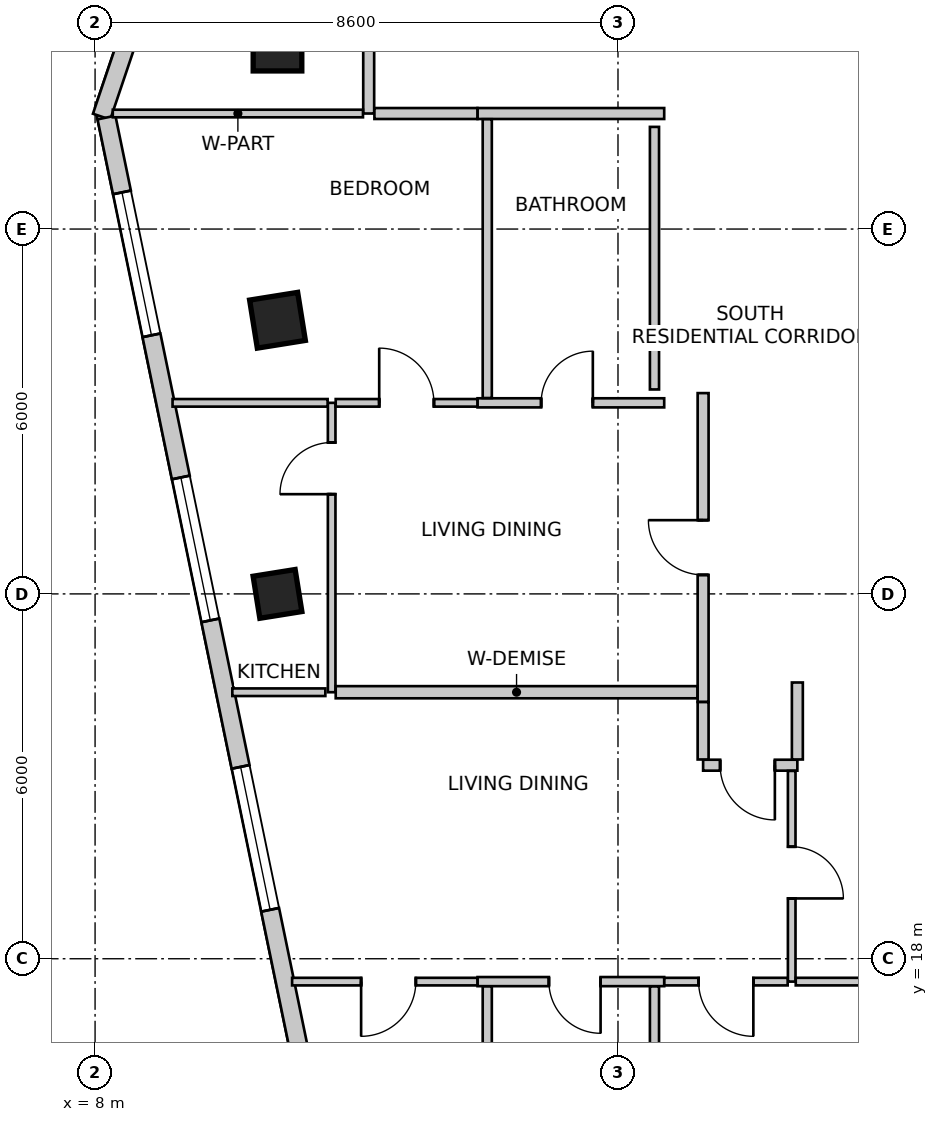
"""IFC4 building model, lengths in metres.
Left out: names, types, materials, properties, quantities, classifications, styles, units other than length and angle.
Written with IfcOpenShell. Run it as: python <this file> out.ifc"""

import sys

from ifc_helpers import new_model, si_unit, direction, frame, frame_2d, origin, origin_2d, place, context, subcontext, project, spatial, rectangle, extrude, source, transform, mapped, element, fill, save


model = new_model("IFC4")
c1 = context("Model", 3, precision=1e-05, world=origin(), true_north=direction((0.0, 1.0)))
c2 = subcontext(c1, "Body", "Model", "MODEL_VIEW")
j1 = project(units=[si_unit("LENGTHUNIT", "METRE"), si_unit("PLANEANGLEUNIT", "RADIAN")], contexts=[c1])
p1 = place(None, origin())
s1 = spatial("IfcSite", under=j1, at=p1, CompositionType="ELEMENT")
p2 = place(p1, origin())
s2 = spatial("IfcBuilding", under=s1, at=p2, CompositionType="ELEMENT")
p3 = place(p2, frame((0.0, 0.0, 218.4)))
s3 = spatial("IfcBuildingStorey", under=s2, at=p3, CompositionType="ELEMENT", Elevation=218.4)
m1 = source(origin(), c2, "Body", "SweptSolid", [
    extrude(rectangle(XDim=0.8, YDim=0.8, at=origin_2d()), origin(), (0.0, 0.0, 1.0), 3.5),
])
for number, where, z_axis, x_axis in (
    (1, (11.0, 33.0, 0.0), (0.0, 0.0, 1.0), (1.0, 0.0, 0.0)),
    (2, (11.0, 28.5, 0.0), (0.0, 0.0, 1.0), (0.158, -0.987, 0.0)),
):
    element("IfcColumn", number, at=place(p3, frame(where, z_axis=z_axis, x_axis=x_axis)), inside=s3, PredefinedType="COLUMN", context=c2, shape_type="MappedRepresentation", body=[
        mapped(m1, transform((0.0, 0.0, 0.0), scale=1.0)),
    ])
m2 = source(origin(), c2, "Body", "SweptSolid", [
    extrude(rectangle(XDim=0.7, YDim=0.7, at=origin_2d()), origin(), (0.0, 0.0, 1.0), 3.5),
])
p4 = place(p3, frame((11.0, 24.0, 0.0), z_axis=(0.0, 0.0, 1.0), x_axis=(0.158158067254, -0.987413806751, 0.0)))
e3 = element("IfcColumn", 3, at=p4, inside=s3, PredefinedType="COLUMN", context=c2, shape_type="MappedRepresentation", body=[
    mapped(m2, transform((0.0, 0.0, 0.0), scale=1.0)),
])
p5 = place(p3, frame((13.269, 47.134, 0.0), z_axis=(0.0, 0.0, 1.0), x_axis=(-0.319920776449, -0.947444297464, 0.0)))
e4 = element("IfcWall", 4, at=p5, inside=s3, PredefinedType="SOLIDWALL", context=c2, shape_type="SweptSolid", body=[
    extrude(rectangle(XDim=16.133, YDim=0.3, at=frame_2d((8.067, 0.0))), origin(), (0.0, 0.0, 1.0), 3.25),
])
m3 = source(origin(), c2, "Body", "SweptSolid", [
    extrude(rectangle(XDim=2.1, YDim=2.0, at=frame_2d((1.05, 1.0))), frame((0.0, 0.16, 0.0), z_axis=(0.0, -1.0, 0.0), x_axis=(1.0, 0.0, 0.0)), (0.0, 0.0, 1.0), 0.32),
])
p6 = place(p5, frame((2.513, 0.0, 0.85)))
e5 = element("IfcOpeningElement", 5, at=p6, cuts=e4, PredefinedType="OPENING", context=c2, shape_type="MappedRepresentation", body=[
    mapped(m3, transform((0.0, 0.0, 0.0), scale=1.0)),
])
m4 = source(origin(), c2, "Body", "SweptSolid", [
    extrude(rectangle(XDim=2.4, YDim=2.2, at=frame_2d((1.2, 1.1))), frame((0.0, 0.16, 0.0), z_axis=(0.0, -1.0, 0.0), x_axis=(1.0, 0.0, 0.0)), (0.0, 0.0, 1.0), 0.32),
])
p7 = place(p5, frame((7.26, 0.0, 0.85)))
e6 = element("IfcOpeningElement", 6, at=p7, cuts=e4, PredefinedType="OPENING", context=c2, shape_type="MappedRepresentation", body=[
    mapped(m4, transform((0.0, 0.0, 0.0), scale=1.0)),
])
p8 = place(p5, frame((12.307, 0.0, 0.85)))
e7 = element("IfcOpeningElement", 7, at=p8, cuts=e4, PredefinedType="OPENING", context=c2, shape_type="MappedRepresentation", body=[
    mapped(m3, transform((0.0, 0.0, 0.0), scale=1.0)),
])
p9 = place(p3, frame((8.188, 31.834, 0.0), z_axis=(0.0, 0.0, 1.0), x_axis=(0.202303475707, -0.979322880217, 0.0)))
e8 = element("IfcWall", 8, at=p9, inside=s3, PredefinedType="SOLIDWALL", context=c2, shape_type="SweptSolid", body=[
    extrude(rectangle(XDim=15.766, YDim=0.3, at=frame_2d((7.883, 0.0))), origin(), (0.0, 0.0, 1.0), 3.25),
])
p10 = place(p9, frame((1.257, 0.0, 0.85)))
e9 = element("IfcOpeningElement", 9, at=p10, cuts=e8, PredefinedType="OPENING", context=c2, shape_type="MappedRepresentation", body=[
    mapped(m4, transform((0.0, 0.0, 0.0), scale=1.0)),
])
p11 = place(p9, frame((6.044, 0.0, 0.85)))
e10 = element("IfcOpeningElement", 10, at=p11, cuts=e8, PredefinedType="OPENING", context=c2, shape_type="MappedRepresentation", body=[
    mapped(m4, transform((0.0, 0.0, 0.0), scale=1.0)),
])
p12 = place(p9, frame((10.904, 0.0, 0.85)))
e11 = element("IfcOpeningElement", 11, at=p12, cuts=e8, PredefinedType="OPENING", context=c2, shape_type="MappedRepresentation", body=[
    mapped(m4, transform((0.0, 0.0, 0.0), scale=1.0)),
])
p13 = place(p3, frame((12.5, 31.9, 0.0), z_axis=(0.0, 0.0, 1.0), x_axis=(0.0, 1.0, 0.0)))
e12 = element("IfcWall", 12, at=p13, inside=s3, PredefinedType="PARTITIONING", context=c2, shape_type="SweptSolid", body=[
    extrude(rectangle(XDim=1.556, YDim=0.18, at=frame_2d((0.778, 0.0))), origin(), (0.0, 0.0, 1.0), 2.919),
])
p14 = place(p3, frame((17.36, 31.9, 0.0), z_axis=(0.0, 0.0, 1.0), x_axis=(-1.0, 0.0, 0.0)))
e13 = element("IfcWall", 13, at=p14, inside=s3, PredefinedType="PARTITIONING", context=c2, shape_type="SweptSolid", body=[
    extrude(rectangle(XDim=3.07, YDim=0.18, at=frame_2d((1.535, 0.0))), origin(), (0.0, 0.0, 1.0), 2.919),
])
p15 = place(p3, frame((14.288, 31.9, 0.0), z_axis=(0.0, 0.0, 1.0), x_axis=(-1.0, 0.0, 0.0)))
e14 = element("IfcWall", 14, at=p15, inside=s3, PredefinedType="PARTITIONING", context=c2, shape_type="SweptSolid", body=[
    extrude(rectangle(XDim=1.694, YDim=0.18, at=frame_2d((0.847, 0.0))), origin(), (0.0, 0.0, 1.0), 2.919),
])
p16 = place(p3, frame((12.406, 31.9, 0.0), z_axis=(0.0, 0.0, 1.0), x_axis=(-1.0, 0.0, 0.0)))
e15 = element("IfcWall", 15, at=p16, inside=s3, PredefinedType="PARTITIONING", context=c2, shape_type="SweptSolid", body=[
    extrude(rectangle(XDim=4.115, YDim=0.125, at=frame_2d((2.057, 0.0))), origin(), (0.0, 0.0, 1.0), 2.542),
])
p17 = place(p3, frame((18.0, 22.223, 0.0), z_axis=(0.0, 0.0, 1.0), x_axis=(0.0, 1.0, 0.0)))
e16 = element("IfcWall", 16, at=p17, inside=s3, PredefinedType="PARTITIONING", context=c2, shape_type="SweptSolid", body=[
    extrude(rectangle(XDim=5.079, YDim=0.18, at=frame_2d((2.54, 0.0))), origin(), (0.0, 0.0, 1.0), 2.766),
])
m5 = source(origin(), c2, "Body", "SweptSolid", [
    extrude(rectangle(XDim=0.9, YDim=2.15, at=frame_2d((0.45, 1.075))), frame((0.0, 0.1, 0.0), z_axis=(0.0, -1.0, 0.0), x_axis=(1.0, 0.0, 0.0)), (0.0, 0.0, 1.0), 0.2),
])
p18 = place(p17, frame((2.09, 0.0, 0.0)))
e17 = element("IfcOpeningElement", 17, at=p18, cuts=e16, PredefinedType="OPENING", context=c2, shape_type="MappedRepresentation", body=[
    mapped(m5, transform((0.0, 0.0, 0.0), scale=1.0)),
])
p19 = place(p3, frame((19.55, 21.183, 0.0), z_axis=(0.0, 0.0, 1.0), x_axis=(-1.0, 0.0, 0.0)))
e18 = element("IfcWall", 18, at=p19, inside=s3, PredefinedType="PARTITIONING", context=c2, shape_type="SweptSolid", body=[
    extrude(rectangle(XDim=1.55, YDim=0.18, at=frame_2d((0.775, 0.0))), origin(), (0.0, 0.0, 1.0), 2.779),
])
p20 = place(p19, frame((0.37, 0.0, 0.0)))
e19 = element("IfcOpeningElement", 19, at=p20, cuts=e18, PredefinedType="OPENING", context=c2, shape_type="MappedRepresentation", body=[
    mapped(m5, transform((0.0, 0.0, 0.0), scale=1.0)),
])
p21 = place(p3, frame((18.0, 21.277, 0.0), z_axis=(0.0, 0.0, 1.0), x_axis=(0.0, 1.0, 0.0)))
e20 = element("IfcWall", 20, at=p21, inside=s3, PredefinedType="PARTITIONING", context=c2, shape_type="SweptSolid", body=[
    extrude(rectangle(XDim=0.944, YDim=0.18, at=frame_2d((0.472, 0.0))), origin(), (0.0, 0.0, 1.0), 2.779),
])
p22 = place(p3, frame((19.55, 22.543, 0.0), z_axis=(0.0, 0.0, 1.0), x_axis=(0.0, -1.0, 0.0)))
e21 = element("IfcWall", 21, at=p22, inside=s3, PredefinedType="PARTITIONING", context=c2, shape_type="SweptSolid", body=[
    extrude(rectangle(XDim=1.266, YDim=0.18, at=frame_2d((0.633, 0.0))), origin(), (0.0, 0.0, 1.0), 3.25),
])
p23 = place(p3, frame((11.891, 22.383, 0.0), z_axis=(0.0, 0.0, 1.0), x_axis=(0.0, 1.0, 0.0)))
e22 = element("IfcWall", 22, at=p23, inside=s3, PredefinedType="PARTITIONING", context=c2, shape_type="SweptSolid", body=[
    extrude(rectangle(XDim=4.759, YDim=0.125, at=frame_2d((2.379, 0.0))), origin(), (0.0, 0.0, 1.0), 2.766),
])
m6 = source(origin(), c2, "Body", "SweptSolid", [
    extrude(rectangle(XDim=0.85, YDim=2.15, at=frame_2d((0.425, 1.075))), frame((0.0, 0.073, 0.0), z_axis=(0.0, -1.0, 0.0), x_axis=(1.0, 0.0, 0.0)), (0.0, 0.0, 1.0), 0.145),
])
p24 = place(p23, frame((3.257, 0.0, 0.0)))
e23 = element("IfcOpeningElement", 23, at=p24, cuts=e22, PredefinedType="OPENING", context=c2, shape_type="MappedRepresentation", body=[
    mapped(m6, transform((0.0, 0.0, 0.0), scale=1.0)),
])
p25 = place(p3, frame((14.29, 27.142, 0.0), z_axis=(0.0, 0.0, 1.0), x_axis=(1.0, 0.0, 0.0)))
e24 = element("IfcWall", 24, at=p25, inside=s3, PredefinedType="PARTITIONING", context=c2, shape_type="SweptSolid", body=[
    extrude(rectangle(XDim=3.07, YDim=0.15, at=frame_2d((1.535, 0.0))), origin(), (0.0, 0.0, 1.0), 2.919),
])
m7 = source(origin(), c2, "Body", "SweptSolid", [
    extrude(rectangle(XDim=0.85, YDim=2.15, at=frame_2d((0.425, 1.075))), frame((0.0, 0.085, 0.0), z_axis=(0.0, -1.0, 0.0), x_axis=(1.0, 0.0, 0.0)), (0.0, 0.0, 1.0), 0.17),
])
p26 = place(p25, frame((1.046, 0.0, 0.0)))
e25 = element("IfcOpeningElement", 25, at=p26, cuts=e24, PredefinedType="OPENING", context=c2, shape_type="MappedRepresentation", body=[
    mapped(m7, transform((0.0, 0.0, 0.0), scale=1.0)),
])
p27 = place(p3, frame((11.958, 27.142, 0.0), z_axis=(0.0, 0.0, 1.0), x_axis=(1.0, 0.0, 0.0)))
e26 = element("IfcWall", 26, at=p27, inside=s3, PredefinedType="PARTITIONING", context=c2, shape_type="SweptSolid", body=[
    extrude(rectangle(XDim=2.331, YDim=0.125, at=frame_2d((1.165, 0.0))), origin(), (0.0, 0.0, 1.0), 3.25),
])
m8 = source(origin(), c2, "Body", "SweptSolid", [
    extrude(rectangle(XDim=0.9, YDim=2.15, at=frame_2d((0.45, 1.075))), frame((0.0, 0.073, 0.0), z_axis=(0.0, -1.0, 0.0), x_axis=(1.0, 0.0, 0.0)), (0.0, 0.0, 1.0), 0.145),
])
p28 = place(p27, frame((0.715, 0.0, 0.0)))
e27 = element("IfcOpeningElement", 27, at=p28, cuts=e26, PredefinedType="OPENING", context=c2, shape_type="MappedRepresentation", body=[
    mapped(m8, transform((0.0, 0.0, 0.0), scale=1.0)),
])
p29 = place(p3, frame((17.906, 22.383, 0.0), z_axis=(0.0, 0.0, 1.0), x_axis=(-1.0, 0.0, 0.0)))
e28 = element("IfcWall", 28, at=p29, inside=s3, PredefinedType="PARTITIONING", context=c2, shape_type="SweptSolid", body=[
    extrude(rectangle(XDim=5.948, YDim=0.2, at=frame_2d((2.974, 0.0))), origin(), (0.0, 0.0, 1.0), 2.779),
])
p30 = place(p3, frame((9.274, 27.142, 0.0), z_axis=(0.0, 0.0, 1.0), x_axis=(1.0, 0.0, 0.0)))
e29 = element("IfcWall", 29, at=p30, inside=s3, PredefinedType="PARTITIONING", context=c2, shape_type="SweptSolid", body=[
    extrude(rectangle(XDim=2.55, YDim=0.125, at=frame_2d((1.275, 0.0))), origin(), (0.0, 0.0, 1.0), 2.542),
])
p31 = place(p3, frame((11.787, 22.383, 0.0), z_axis=(0.0, 0.0, 1.0), x_axis=(-1.0, 0.0, 0.0)))
e30 = element("IfcWall", 30, at=p31, inside=s3, PredefinedType="PARTITIONING", context=c2, shape_type="SweptSolid", body=[
    extrude(rectangle(XDim=1.53, YDim=0.125, at=frame_2d((0.765, 0.0))), origin(), (0.0, 0.0, 1.0), 3.25),
])
p32 = place(p3, frame((14.45, 27.221, 0.0), z_axis=(0.0, 0.0, 1.0), x_axis=(0.0, 1.0, 0.0)))
e31 = element("IfcWall", 31, at=p32, inside=s3, PredefinedType="PARTITIONING", context=c2, shape_type="SweptSolid", body=[
    extrude(rectangle(XDim=4.585, YDim=0.15, at=frame_2d((2.292, 0.0))), origin(), (0.0, 0.0, 1.0), 2.766),
])
p33 = place(p3, frame((19.457, 21.089, 0.0), z_axis=(0.0, 0.0, 1.0), x_axis=(0.0, -1.0, 0.0)))
e32 = element("IfcWall", 32, at=p33, inside=s3, PredefinedType="PARTITIONING", context=c2, shape_type="SweptSolid", body=[
    extrude(rectangle(XDim=3.465, YDim=0.125, at=frame_2d((1.732, 0.0))), origin(), (0.0, 0.0, 1.0), 2.779),
])
p34 = place(p33, frame((1.247, 0.0, 0.0)))
e33 = element("IfcOpeningElement", 33, at=p34, cuts=e32, PredefinedType="OPENING", context=c2, shape_type="MappedRepresentation", body=[
    mapped(m6, transform((0.0, 0.0, 0.0), scale=1.0)),
])
p35 = place(p3, frame((17.36, 17.624, 0.0), z_axis=(0.0, 0.0, 1.0), x_axis=(-1.0, 0.0, 0.0)))
e34 = element("IfcWall", 34, at=p35, inside=s3, PredefinedType="PARTITIONING", context=c2, shape_type="SweptSolid", body=[
    extrude(rectangle(XDim=3.07, YDim=0.15, at=frame_2d((1.535, 0.0))), origin(), (0.0, 0.0, 1.0), 3.25),
])
p36 = place(p35, frame((1.046, 0.0, 0.0)))
e35 = element("IfcOpeningElement", 35, at=p36, cuts=e34, PredefinedType="OPENING", context=c2, shape_type="MappedRepresentation", body=[
    mapped(m7, transform((0.0, 0.0, 0.0), scale=1.0)),
])
p37 = place(p3, frame((14.288, 17.624, 0.0), z_axis=(0.0, 0.0, 1.0), x_axis=(-1.0, 0.0, 0.0)))
e36 = element("IfcWall", 36, at=p37, inside=s3, PredefinedType="PARTITIONING", context=c2, shape_type="SweptSolid", body=[
    extrude(rectangle(XDim=3.048, YDim=0.125, at=frame_2d((1.524, 0.0))), origin(), (0.0, 0.0, 1.0), 3.25),
])
p38 = place(p37, frame((1.013, 0.0, 0.0)))
e37 = element("IfcOpeningElement", 37, at=p38, cuts=e36, PredefinedType="OPENING", context=c2, shape_type="MappedRepresentation", body=[
    mapped(m8, transform((0.0, 0.0, 0.0), scale=1.0)),
])
p39 = place(p3, frame((19.39, 17.624, 0.0), z_axis=(0.0, 0.0, 1.0), x_axis=(-1.0, 0.0, 0.0)))
e38 = element("IfcWall", 38, at=p39, inside=s3, PredefinedType="PARTITIONING", context=c2, shape_type="SweptSolid", body=[
    extrude(rectangle(XDim=2.028, YDim=0.125, at=frame_2d((1.014, 0.0))), origin(), (0.0, 0.0, 1.0), 3.25),
])
p40 = place(p39, frame((0.564, 0.0, 0.0)))
e39 = element("IfcOpeningElement", 39, at=p40, cuts=e38, PredefinedType="OPENING", context=c2, shape_type="MappedRepresentation", body=[
    mapped(m8, transform((0.0, 0.0, 0.0), scale=1.0)),
])
p41 = place(p3, frame((22.46, 17.624, 0.0), z_axis=(0.0, 0.0, 1.0), x_axis=(-1.0, 0.0, 0.0)))
e40 = element("IfcWall", 40, at=p41, inside=s3, PredefinedType="PARTITIONING", context=c2, shape_type="SweptSolid", body=[
    extrude(rectangle(XDim=2.937, YDim=0.125, at=frame_2d((1.468, 0.0))), origin(), (0.0, 0.0, 1.0), 2.779),
])
p42 = place(p3, frame((14.45, 12.865, 0.0), z_axis=(0.0, 0.0, 1.0), x_axis=(0.0, 1.0, 0.0)))
e41 = element("IfcWall", 41, at=p42, inside=s3, PredefinedType="PARTITIONING", context=c2, shape_type="SweptSolid", body=[
    extrude(rectangle(XDim=4.68, YDim=0.15, at=frame_2d((2.34, 0.0))), origin(), (0.0, 0.0, 1.0), 3.25),
])
p43 = place(p3, frame((17.2, 17.545, 0.0), z_axis=(0.0, 0.0, 1.0), x_axis=(0.0, -1.0, 0.0)))
e42 = element("IfcWall", 42, at=p43, inside=s3, PredefinedType="PARTITIONING", context=c2, shape_type="SweptSolid", body=[
    extrude(rectangle(XDim=4.68, YDim=0.15, at=frame_2d((2.34, 0.0))), origin(), (0.0, 0.0, 1.0), 2.542),
])
p44 = place(p3, frame((17.2, 31.68, 0.0), z_axis=(0.0, 0.0, 1.0), x_axis=(0.0, -1.0, 0.0)))
e43 = element("IfcWall", 43, at=p44, inside=s3, PredefinedType="PARTITIONING", context=c2, shape_type="SweptSolid", body=[
    extrude(rectangle(XDim=4.318, YDim=0.15, at=frame_2d((2.159, 0.0))), origin(), (0.0, 0.0, 1.0), 2.766),
])
m9 = source(origin(), c2, "Body", "SweptSolid", [
    extrude(rectangle(XDim=2.4, YDim=2.2, at=frame_2d((1.2, 1.1))), frame((0.0, -0.015, 0.0), z_axis=(0.0, -1.0, 0.0), x_axis=(1.0, 0.0, 0.0)), (0.0, 0.0, 1.0), 0.06),
])
p45 = place(p10, origin())
e44 = element("IfcWindow", 44, at=p45, inside=s3, PartitioningType="SINGLE_PANEL", PredefinedType="WINDOW", context=c2, shape_type="MappedRepresentation", body=[
    mapped(m9, transform((0.0, 0.0, 0.0), scale=1.0)),
])
fill(e9, e44)
p46 = place(p11, origin())
e45 = element("IfcWindow", 45, at=p46, inside=s3, PartitioningType="SINGLE_PANEL", PredefinedType="WINDOW", context=c2, shape_type="MappedRepresentation", body=[
    mapped(m9, transform((0.0, 0.0, 0.0), scale=1.0)),
])
fill(e10, e45)
p47 = place(p12, origin())
e46 = element("IfcWindow", 46, at=p47, inside=s3, PartitioningType="SINGLE_PANEL", PredefinedType="WINDOW", context=c2, shape_type="MappedRepresentation", body=[
    mapped(m9, transform((0.0, 0.0, 0.0), scale=1.0)),
])
fill(e11, e46)
m10 = source(origin(), c2, "Body", "SweptSolid", [
    extrude(rectangle(XDim=0.9, YDim=2.15, at=frame_2d((0.45, 1.075))), frame((0.0, 0.025, 0.0), z_axis=(0.0, -1.0, 0.0), x_axis=(1.0, 0.0, 0.0)), (0.0, 0.0, 1.0), 0.05),
])
p48 = place(p18, origin())
e47 = element("IfcDoor", 47, at=p48, inside=s3, OperationType="SINGLE_SWING_RIGHT", PredefinedType="DOOR", context=c2, shape_type="MappedRepresentation", body=[
    mapped(m10, transform((0.0, 0.0, 0.0), scale=1.0)),
])
fill(e17, e47)
m11 = source(origin(), c2, "Body", "SweptSolid", [
    extrude(rectangle(XDim=0.85, YDim=2.15, at=frame_2d((0.425, 1.075))), frame((0.0, 0.025, 0.0), z_axis=(0.0, -1.0, 0.0), x_axis=(1.0, 0.0, 0.0)), (0.0, 0.0, 1.0), 0.05),
])
p49 = place(p24, origin())
e48 = element("IfcDoor", 48, at=p49, inside=s3, OperationType="SINGLE_SWING_LEFT", PredefinedType="DOOR", context=c2, shape_type="MappedRepresentation", body=[
    mapped(m11, transform((0.0, 0.0, 0.0), scale=1.0)),
])
fill(e23, e48)
p50 = place(p26, origin())
e49 = element("IfcDoor", 49, at=p50, inside=s3, OperationType="SINGLE_SWING_RIGHT", PredefinedType="DOOR", context=c2, shape_type="MappedRepresentation", body=[
    mapped(m11, transform((0.0, 0.0, 0.0), scale=1.0)),
])
fill(e25, e49)
m12 = source(origin(), c2, "Body", "SweptSolid", [
    extrude(rectangle(XDim=0.9, YDim=2.15, at=frame_2d((0.45, 1.075))), frame((0.0, 0.025, 0.0), z_axis=(0.0, -1.0, 0.0), x_axis=(1.0, 0.0, 0.0)), (0.0, 0.0, 1.0), 0.05),
])
p51 = place(p28, origin())
e50 = element("IfcDoor", 50, at=p51, inside=s3, OperationType="SINGLE_SWING_LEFT", PredefinedType="DOOR", context=c2, shape_type="MappedRepresentation", body=[
    mapped(m12, transform((0.0, 0.0, 0.0), scale=1.0)),
])
fill(e27, e50)
p52 = place(p20, origin())
e51 = element("IfcDoor", 51, at=p52, inside=s3, OperationType="SINGLE_SWING_LEFT", PredefinedType="DOOR", context=c2, shape_type="MappedRepresentation", body=[
    mapped(m10, transform((0.0, 0.0, 0.0), scale=1.0)),
])
fill(e19, e51)
p53 = place(p34, origin())
e52 = element("IfcDoor", 52, at=p53, inside=s3, OperationType="SINGLE_SWING_RIGHT", PredefinedType="DOOR", context=c2, shape_type="MappedRepresentation", body=[
    mapped(m11, transform((0.0, 0.0, 0.0), scale=1.0)),
])
fill(e33, e52)
p54 = place(p36, origin())
e53 = element("IfcDoor", 53, at=p54, inside=s3, OperationType="SINGLE_SWING_LEFT", PredefinedType="DOOR", context=c2, shape_type="MappedRepresentation", body=[
    mapped(m11, transform((0.0, 0.0, 0.0), scale=1.0)),
])
fill(e35, e53)
p55 = place(p38, origin())
e54 = element("IfcDoor", 54, at=p55, inside=s3, OperationType="SINGLE_SWING_RIGHT", PredefinedType="DOOR", context=c2, shape_type="MappedRepresentation", body=[
    mapped(m12, transform((0.0, 0.0, 0.0), scale=1.0)),
])
fill(e37, e54)
p56 = place(p40, origin())
e55 = element("IfcDoor", 55, at=p56, inside=s3, OperationType="SINGLE_SWING_LEFT", PredefinedType="DOOR", context=c2, shape_type="MappedRepresentation", body=[
    mapped(m12, transform((0.0, 0.0, 0.0), scale=1.0)),
])
fill(e39, e55)
save(model, sys.argv[1])
